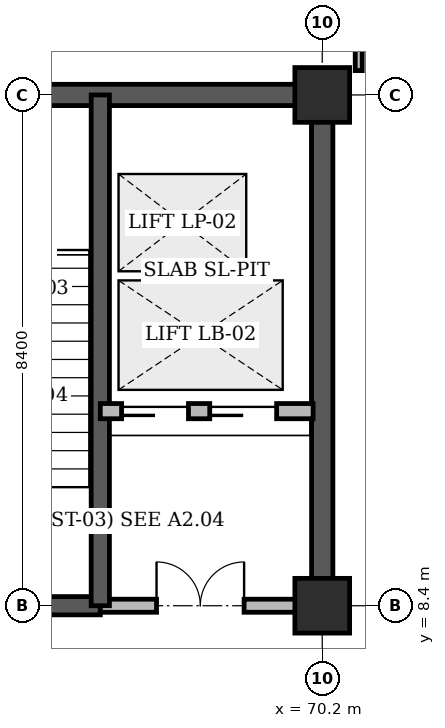
"""IFC4 building model, lengths in metres.
Left out: names, types, materials, properties, quantities, classifications, styles, units other than length and angle.
Written with IfcOpenShell. Run it as: python <this file> out.ifc"""

import sys

from ifc_helpers import new_model, si_unit, direction, frame, frame_2d, origin, origin_2d, place, context, subcontext, project, spatial, rectangle, extrude, element, fill, save


model = new_model("IFC4")
c1 = context("Model", 3, precision=1e-05, world=origin(), true_north=direction((0.0, 1.0)))
c2 = subcontext(c1, "Body", "Model", "MODEL_VIEW")
j1 = project(units=[si_unit("LENGTHUNIT", "METRE"), si_unit("PLANEANGLEUNIT", "RADIAN")], contexts=[c1])
p1 = place(None, origin())
s1 = spatial("IfcSite", under=j1, at=p1, CompositionType="ELEMENT")
p2 = place(p1, origin())
s2 = spatial("IfcBuilding", under=s1, at=p2, CompositionType="ELEMENT")
p3 = place(p2, frame((0.0, 0.0, -4.8)))
s3 = spatial("IfcBuildingStorey", under=s2, at=p3, CompositionType="ELEMENT", Elevation=-4.8)
p4 = place(p3, frame((62.225, 16.8, 0.0), z_axis=(0.0, 0.0, 1.0), x_axis=(1.0, 0.0, 0.0)))
e1 = element("IfcWall", 1, at=p4, inside=s3, PredefinedType="SHEAR", context=c2, shape_type="SweptSolid", body=[
    extrude(rectangle(XDim=8.15, YDim=0.35, at=frame_2d((4.075, 0.0))), origin(), (0.0, 0.0, 1.0), 4.4),
])
p5 = place(p3, frame((70.2, 8.4, 0.0), z_axis=(0.0, 0.0, 1.0), x_axis=(0.0, 1.0, 0.0)))
e2 = element("IfcWall", 2, at=p5, inside=s3, PredefinedType="SHEAR", context=c2, shape_type="SweptSolid", body=[
    extrude(rectangle(XDim=8.4, YDim=0.35, at=frame_2d((4.2, 0.0))), origin(), (0.0, 0.0, 1.0), 4.4),
])
for number, where, z_axis, x_axis in (
    (3, (70.2, 8.4, 0.0), (0.0, 0.0, 1.0), (1.0, 0.0, 0.0)),
    (4, (70.2, 16.8, 0.0), (0.0, 0.0, 1.0), (1.0, 0.0, 0.0)),
):
    element("IfcColumn", number, at=place(p3, frame(where, z_axis=z_axis, x_axis=x_axis)), inside=s3, PredefinedType="COLUMN", context=c2, shape_type="SweptSolid", body=[
        extrude(rectangle(XDim=0.9, YDim=0.9, at=origin_2d()), origin(), (0.0, 0.0, 1.0), 4.8),
    ])
p6 = place(p3, frame((62.4, 8.4, 0.0), z_axis=(0.0, 0.0, 1.0), x_axis=(1.0, 0.0, 0.0)))
e5 = element("IfcWall", 5, at=p6, inside=s3, PredefinedType="SHEAR", context=c2, shape_type="SweptSolid", body=[
    extrude(rectangle(XDim=4.15, YDim=0.3, at=frame_2d((2.075, 0.0))), origin(), (0.0, 0.0, 1.0), 4.8),
])
p7 = place(p6, frame((1.515, 0.0, 0.0)))
e6 = element("IfcOpeningElement", 6, at=p7, cuts=e5, PredefinedType="OPENING", context=c2, shape_type="SweptSolid", body=[
    extrude(rectangle(XDim=1.12, YDim=2.15, at=frame_2d((0.56, 1.075))), frame((0.0, 0.16, 0.0), z_axis=(0.0, -1.0, 0.0), x_axis=(1.0, 0.0, 0.0)), (0.0, 0.0, 1.0), 0.32),
])
p8 = place(p3, frame((66.55, 8.4, 0.0), z_axis=(0.0, 0.0, 1.0), x_axis=(1.0, 0.0, 0.0)))
e7 = element("IfcWall", 7, at=p8, inside=s3, PredefinedType="STANDARD", context=c2, shape_type="SweptSolid", body=[
    extrude(rectangle(XDim=3.29, YDim=0.215, at=frame_2d((1.645, 0.0))), origin(), (0.0, 0.0, 1.0), 3.53),
])
p9 = place(p8, frame((0.925, 0.0, 0.0)))
e8 = element("IfcOpeningElement", 8, at=p9, cuts=e7, PredefinedType="OPENING", context=c2, shape_type="SweptSolid", body=[
    extrude(rectangle(XDim=1.44, YDim=2.2, at=frame_2d((0.72, 1.1))), frame((0.0, 0.118, 0.0), z_axis=(0.0, -1.0, 0.0), x_axis=(1.0, 0.0, 0.0)), (0.0, 0.0, 1.0), 0.235),
])
p10 = place(p3, frame((66.55, 8.4, 0.0), z_axis=(0.0, 0.0, 1.0), x_axis=(0.0, 1.0, 0.0)))
e9 = element("IfcWall", 9, at=p10, inside=s3, PredefinedType="SHEAR", context=c2, shape_type="SweptSolid", body=[
    extrude(rectangle(XDim=8.4, YDim=0.3, at=frame_2d((4.2, 0.0))), origin(), (0.0, 0.0, 1.0), 4.8),
])
p11 = place(p3, frame((66.55, 11.6, 0.0), z_axis=(0.0, 0.0, 1.0), x_axis=(1.0, 0.0, 0.0)))
e10 = element("IfcWall", 10, at=p11, inside=s3, PredefinedType="STANDARD", context=c2, shape_type="SweptSolid", body=[
    extrude(rectangle(XDim=3.5, YDim=0.25, at=frame_2d((1.75, 0.0))), origin(), (0.0, 0.0, 1.0), 4.46),
])
p12 = place(p11, frame((0.35, 0.0, 0.0)))
e11 = element("IfcOpeningElement", 11, at=p12, cuts=e10, PredefinedType="OPENING", context=c2, shape_type="SweptSolid", body=[
    extrude(rectangle(XDim=1.1, YDim=2.2, at=frame_2d((0.55, 1.1))), frame((0.0, 0.135, 0.0), z_axis=(0.0, -1.0, 0.0), x_axis=(1.0, 0.0, 0.0)), (0.0, 0.0, 1.0), 0.27),
])
p13 = place(p11, frame((1.8, 0.0, 0.0)))
e12 = element("IfcOpeningElement", 12, at=p13, cuts=e10, PredefinedType="OPENING", context=c2, shape_type="SweptSolid", body=[
    extrude(rectangle(XDim=1.1, YDim=2.2, at=frame_2d((0.55, 1.1))), frame((0.0, 0.135, 0.0), z_axis=(0.0, -1.0, 0.0), x_axis=(1.0, 0.0, 0.0)), (0.0, 0.0, 1.0), 0.27),
])
p14 = place(p3, frame((70.8, 17.2, 0.0), z_axis=(0.0, 0.0, 1.0), x_axis=(0.0, 1.0, 0.0)))
e13 = element("IfcWall", 13, at=p14, inside=s3, PredefinedType="PARTITIONING", context=c2, shape_type="SweptSolid", body=[
    extrude(rectangle(XDim=7.6, YDim=0.115, at=frame_2d((3.8, 0.0))), origin(), (0.0, 0.0, 1.0), 4.46),
])
p15 = place(p14, frame((3.14, 0.0, 0.0)))
e14 = element("IfcOpeningElement", 14, at=p15, cuts=e13, PredefinedType="OPENING", context=c2, shape_type="SweptSolid", body=[
    extrude(rectangle(XDim=1.32, YDim=2.15, at=frame_2d((0.66, 1.075))), frame((0.0, 0.067, 0.0), z_axis=(0.0, -1.0, 0.0), x_axis=(1.0, 0.0, 0.0)), (0.0, 0.0, 1.0), 0.135),
])
p16 = place(p9, origin())
e15 = element("IfcDoor", 15, at=p16, inside=s3, OperationType="DOUBLE_DOOR_SINGLE_SWING", PredefinedType="DOOR", context=c2, shape_type="SweptSolid", body=[
    extrude(rectangle(XDim=1.44, YDim=2.2, at=frame_2d((0.72, 1.1))), frame((0.0, 0.025, 0.0), z_axis=(0.0, -1.0, 0.0), x_axis=(1.0, 0.0, 0.0)), (0.0, 0.0, 1.0), 0.05),
])
fill(e8, e15)
p17 = place(p12, origin())
e16 = element("IfcDoor", 16, at=p17, inside=s3, OperationType="SLIDING_TO_LEFT", PredefinedType="DOOR", context=c2, shape_type="SweptSolid", body=[
    extrude(rectangle(XDim=1.1, YDim=2.2, at=frame_2d((0.55, 1.1))), frame((0.0, 0.025, 0.0), z_axis=(0.0, -1.0, 0.0), x_axis=(1.0, 0.0, 0.0)), (0.0, 0.0, 1.0), 0.05),
])
fill(e11, e16)
p18 = place(p13, origin())
e17 = element("IfcDoor", 17, at=p18, inside=s3, OperationType="SLIDING_TO_LEFT", PredefinedType="DOOR", context=c2, shape_type="SweptSolid", body=[
    extrude(rectangle(XDim=1.1, YDim=2.2, at=frame_2d((0.55, 1.1))), frame((0.0, 0.025, 0.0), z_axis=(0.0, -1.0, 0.0), x_axis=(1.0, 0.0, 0.0)), (0.0, 0.0, 1.0), 0.05),
])
fill(e12, e17)
save(model, sys.argv[1])
